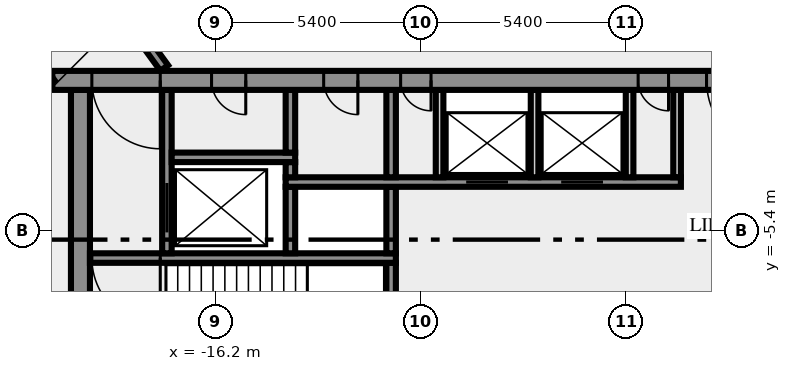
"""IFC4 building model, lengths in metres.
Left out: names, types, materials, properties, quantities, classifications, styles, units other than length and angle.
Written with IfcOpenShell. Run it as: python <this file> out.ifc"""

import sys

from ifc_helpers import new_model, si_unit, direction, frame, frame_2d, origin, place, context, subcontext, project, spatial, rectangle, extrude, element, fill, save


model = new_model("IFC4")
c1 = context("Model", 3, precision=1e-05, world=origin(), true_north=direction((0.0, 1.0)))
c2 = subcontext(c1, "Body", "Model", "MODEL_VIEW")
j1 = project(units=[si_unit("LENGTHUNIT", "METRE"), si_unit("PLANEANGLEUNIT", "RADIAN")], contexts=[c1])
p1 = place(None, origin())
s1 = spatial("IfcSite", under=j1, at=p1, CompositionType="ELEMENT")
p2 = place(p1, origin())
s2 = spatial("IfcBuilding", under=s1, at=p2, CompositionType="ELEMENT")
p3 = place(p2, frame((0.0, 0.0, 307.0)))
s3 = spatial("IfcBuildingStorey", under=s2, at=p3, CompositionType="ELEMENT", Elevation=307.0)
p4 = place(p3, frame((-19.75, -10.5, 0.0), z_axis=(0.0, 0.0, 1.0), x_axis=(0.0, 1.0, 0.0)))
e1 = element("IfcWall", 1, at=p4, inside=s3, PredefinedType="SHEAR", context=c2, shape_type="SweptSolid", body=[
    extrude(rectangle(XDim=8.8, YDim=0.5, at=frame_2d((4.4, 0.0))), origin(), (0.0, 0.0, 1.0), 3.65),
])
p5 = place(p3, frame((-11.575, -7.25, 0.0), z_axis=(0.0, 0.0, 1.0), x_axis=(0.0, 1.0, 0.0)))
e2 = element("IfcWall", 2, at=p5, inside=s3, PredefinedType="SHEAR", context=c2, shape_type="SweptSolid", body=[
    extrude(rectangle(XDim=1.0, YDim=0.25, at=frame_2d((0.5, 0.0))), origin(), (0.0, 0.0, 1.0), 3.65),
])
p6 = place(p3, frame((-11.45, -6.125, 0.0), z_axis=(0.0, 0.0, 1.0), x_axis=(-1.0, 0.0, 0.0)))
e3 = element("IfcWall", 3, at=p6, inside=s3, PredefinedType="SHEAR", context=c2, shape_type="SweptSolid", body=[
    extrude(rectangle(XDim=8.05, YDim=0.25, at=frame_2d((4.025, 0.0))), origin(), (0.0, 0.0, 1.0), 3.65),
])
p7 = place(p6, frame((6.2, 0.0, 0.0)))
e4 = element("IfcOpeningElement", 4, at=p7, cuts=e3, PredefinedType="OPENING", context=c2, shape_type="SweptSolid", body=[
    extrude(rectangle(XDim=1.8, YDim=2.1, at=frame_2d((0.9, 1.05))), frame((0.0, 0.135, 0.0), z_axis=(0.0, -1.0, 0.0), x_axis=(1.0, 0.0, 0.0)), (0.0, 0.0, 1.0), 0.27),
])
p8 = place(p3, frame((-17.475, -6.0, 0.0), z_axis=(0.0, 0.0, 1.0), x_axis=(0.0, 1.0, 0.0)))
e5 = element("IfcWall", 5, at=p8, inside=s3, PredefinedType="SHEAR", context=c2, shape_type="SweptSolid", body=[
    extrude(rectangle(XDim=4.3, YDim=0.25, at=frame_2d((2.15, 0.0))), origin(), (0.0, 0.0, 1.0), 3.65),
])
p9 = place(p8, frame((0.55, 0.0, 0.0)))
e6 = element("IfcOpeningElement", 6, at=p9, cuts=e5, PredefinedType="OPENING", context=c2, shape_type="SweptSolid", body=[
    extrude(rectangle(XDim=1.3, YDim=2.1, at=frame_2d((0.65, 1.05))), frame((0.0, 0.135, 0.0), z_axis=(0.0, -1.0, 0.0), x_axis=(1.0, 0.0, 0.0)), (0.0, 0.0, 1.0), 0.27),
])
for number, where, z_axis, x_axis in (
    (7, (-14.225, -6.0, 0.0), (0.0, 0.0, 1.0), (0.0, 1.0, 0.0)),
    (8, (-11.575, -6.0, 0.0), (0.0, 0.0, 1.0), (0.0, 1.0, 0.0)),
):
    element("IfcWall", number, at=place(p3, frame(where, z_axis=z_axis, x_axis=x_axis)), inside=s3, PredefinedType="SHEAR", context=c2, shape_type="SweptSolid", body=[
        extrude(rectangle(XDim=1.75, YDim=0.25, at=frame_2d((0.875, 0.0))), origin(), (0.0, 0.0, 1.0), 3.65),
    ])
p10 = place(p3, frame((-14.35, -4.125, 0.0), z_axis=(0.0, 0.0, 1.0), x_axis=(1.0, 0.0, 0.0)))
e9 = element("IfcWall", 9, at=p10, inside=s3, PredefinedType="SHEAR", context=c2, shape_type="SweptSolid", body=[
    extrude(rectangle(XDim=10.4, YDim=0.25, at=frame_2d((5.2, 0.0))), origin(), (0.0, 0.0, 1.0), 3.65),
])
p11 = place(p10, frame((4.75, 0.0, 0.0)))
e10 = element("IfcOpeningElement", 10, at=p11, cuts=e9, PredefinedType="OPENING", context=c2, shape_type="SweptSolid", body=[
    extrude(rectangle(XDim=1.1, YDim=2.1, at=frame_2d((0.55, 1.05))), frame((0.0, 0.135, 0.0), z_axis=(0.0, -1.0, 0.0), x_axis=(1.0, 0.0, 0.0)), (0.0, 0.0, 1.0), 0.27),
])
p12 = place(p10, frame((7.25, 0.0, 0.0)))
e11 = element("IfcOpeningElement", 11, at=p12, cuts=e9, PredefinedType="OPENING", context=c2, shape_type="SweptSolid", body=[
    extrude(rectangle(XDim=1.1, YDim=2.1, at=frame_2d((0.55, 1.05))), frame((0.0, 0.135, 0.0), z_axis=(0.0, -1.0, 0.0), x_axis=(1.0, 0.0, 0.0)), (0.0, 0.0, 1.0), 0.27),
])
p13 = place(p3, frame((-14.225, -4.0, 0.0), z_axis=(0.0, 0.0, 1.0), x_axis=(0.0, 1.0, 0.0)))
e12 = element("IfcWall", 12, at=p13, inside=s3, PredefinedType="SHEAR", context=c2, shape_type="SweptSolid", body=[
    extrude(rectangle(XDim=0.4, YDim=0.25, at=frame_2d((0.2, 0.0))), origin(), (0.0, 0.0, 1.0), 3.65),
])
p14 = place(p3, frame((-11.575, -4.0, 0.0), z_axis=(0.0, 0.0, 1.0), x_axis=(0.0, 1.0, 0.0)))
e13 = element("IfcWall", 13, at=p14, inside=s3, PredefinedType="SHEAR", context=c2, shape_type="SweptSolid", body=[
    extrude(rectangle(XDim=2.3, YDim=0.25, at=frame_2d((1.15, 0.0))), origin(), (0.0, 0.0, 1.0), 3.65),
])
for number, where, z_axis, x_axis in (
    (14, (-10.3, -4.0, 0.0), (0.0, 0.0, 1.0), (0.0, 1.0, 0.0)),
    (15, (-7.8, -4.0, 0.0), (0.0, 0.0, 1.0), (0.0, 1.0, 0.0)),
    (16, (-5.3, -4.0, 0.0), (0.0, 0.0, 1.0), (0.0, 1.0, 0.0)),
    (17, (-4.05, -4.0, 0.0), (0.0, 0.0, 1.0), (0.0, 1.0, 0.0)),
):
    element("IfcWall", number, at=place(p3, frame(where, z_axis=z_axis, x_axis=x_axis)), inside=s3, PredefinedType="SOLIDWALL", context=c2, shape_type="SweptSolid", body=[
        extrude(rectangle(XDim=2.3, YDim=0.2, at=frame_2d((1.15, 0.0))), origin(), (0.0, 0.0, 1.0), 3.65),
    ])
p15 = place(p3, frame((-17.35, -3.475, 0.0), z_axis=(0.0, 0.0, 1.0), x_axis=(1.0, 0.0, 0.0)))
e18 = element("IfcWall", 18, at=p15, inside=s3, PredefinedType="SHEAR", context=c2, shape_type="SweptSolid", body=[
    extrude(rectangle(XDim=3.25, YDim=0.25, at=frame_2d((1.625, 0.0))), origin(), (0.0, 0.0, 1.0), 3.65),
])
p16 = place(p3, frame((-14.225, -3.35, 0.0), z_axis=(0.0, 0.0, 1.0), x_axis=(0.0, 1.0, 0.0)))
e19 = element("IfcWall", 19, at=p16, inside=s3, PredefinedType="SHEAR", context=c2, shape_type="SweptSolid", body=[
    extrude(rectangle(XDim=1.65, YDim=0.25, at=frame_2d((0.825, 0.0))), origin(), (0.0, 0.0, 1.0), 3.65),
])
p17 = place(p3, frame((20.49, -1.45, 0.0), z_axis=(0.0, 0.0, 1.0), x_axis=(-1.0, 0.0, 0.0)))
e20 = element("IfcWall", 20, at=p17, inside=s3, PredefinedType="SHEAR", context=c2, shape_type="SweptSolid", body=[
    extrude(rectangle(XDim=40.98, YDim=0.5, at=frame_2d((20.49, 0.0))), origin(), (0.0, 0.0, 1.0), 3.65),
])
p18 = place(p17, frame((38.14, 0.0, 0.0)))
e21 = element("IfcOpeningElement", 21, at=p18, cuts=e20, PredefinedType="OPENING", context=c2, shape_type="SweptSolid", body=[
    extrude(rectangle(XDim=1.8, YDim=2.1, at=frame_2d((0.9, 1.05))), frame((0.0, 0.26, 0.0), z_axis=(0.0, -1.0, 0.0), x_axis=(1.0, 0.0, 0.0)), (0.0, 0.0, 1.0), 0.52),
])
p19 = place(p17, frame((35.89, 0.0, 0.0)))
e22 = element("IfcOpeningElement", 22, at=p19, cuts=e20, PredefinedType="OPENING", context=c2, shape_type="SweptSolid", body=[
    extrude(rectangle(XDim=0.9, YDim=2.1, at=frame_2d((0.45, 1.05))), frame((0.0, 0.26, 0.0), z_axis=(0.0, -1.0, 0.0), x_axis=(1.0, 0.0, 0.0)), (0.0, 0.0, 1.0), 0.52),
])
p20 = place(p17, frame((32.94, 0.0, 0.0)))
e23 = element("IfcOpeningElement", 23, at=p20, cuts=e20, PredefinedType="OPENING", context=c2, shape_type="SweptSolid", body=[
    extrude(rectangle(XDim=0.9, YDim=2.1, at=frame_2d((0.45, 1.05))), frame((0.0, 0.26, 0.0), z_axis=(0.0, -1.0, 0.0), x_axis=(1.0, 0.0, 0.0)), (0.0, 0.0, 1.0), 0.52),
])
p21 = place(p17, frame((31.015, 0.0, 0.0)))
e24 = element("IfcOpeningElement", 24, at=p21, cuts=e20, PredefinedType="OPENING", context=c2, shape_type="SweptSolid", body=[
    extrude(rectangle(XDim=0.8, YDim=2.1, at=frame_2d((0.4, 1.05))), frame((0.0, 0.26, 0.0), z_axis=(0.0, -1.0, 0.0), x_axis=(1.0, 0.0, 0.0)), (0.0, 0.0, 1.0), 0.52),
])
p22 = place(p17, frame((24.765, 0.0, 0.0)))
e25 = element("IfcOpeningElement", 25, at=p22, cuts=e20, PredefinedType="OPENING", context=c2, shape_type="SweptSolid", body=[
    extrude(rectangle(XDim=0.8, YDim=2.1, at=frame_2d((0.4, 1.05))), frame((0.0, 0.26, 0.0), z_axis=(0.0, -1.0, 0.0), x_axis=(1.0, 0.0, 0.0)), (0.0, 0.0, 1.0), 0.52),
])
p23 = place(p17, frame((21.765, 0.0, 0.0)))
e26 = element("IfcOpeningElement", 26, at=p23, cuts=e20, PredefinedType="OPENING", context=c2, shape_type="SweptSolid", body=[
    extrude(rectangle(XDim=2.0, YDim=2.1, at=frame_2d((1.0, 1.05))), frame((0.0, 0.26, 0.0), z_axis=(0.0, -1.0, 0.0), x_axis=(1.0, 0.0, 0.0)), (0.0, 0.0, 1.0), 0.52),
])
p24 = place(p17, frame((12.24, 0.0, 0.0)))
e27 = element("IfcOpeningElement", 27, at=p24, cuts=e20, PredefinedType="OPENING", context=c2, shape_type="SweptSolid", body=[
    extrude(rectangle(XDim=0.9, YDim=2.1, at=frame_2d((0.45, 1.05))), frame((0.0, 0.26, 0.0), z_axis=(0.0, -1.0, 0.0), x_axis=(1.0, 0.0, 0.0)), (0.0, 0.0, 1.0), 0.52),
])
p25 = place(p17, frame((7.14, 0.0, 0.0)))
e28 = element("IfcOpeningElement", 28, at=p25, cuts=e20, PredefinedType="OPENING", context=c2, shape_type="SweptSolid", body=[
    extrude(rectangle(XDim=0.9, YDim=2.1, at=frame_2d((0.45, 1.05))), frame((0.0, 0.26, 0.0), z_axis=(0.0, -1.0, 0.0), x_axis=(1.0, 0.0, 0.0)), (0.0, 0.0, 1.0), 0.52),
])
p26 = place(p17, frame((5.028, 0.0, 0.0)))
e29 = element("IfcOpeningElement", 29, at=p26, cuts=e20, PredefinedType="OPENING", context=c2, shape_type="SweptSolid", body=[
    extrude(rectangle(XDim=0.8, YDim=2.1, at=frame_2d((0.4, 1.05))), frame((0.0, 0.26, 0.0), z_axis=(0.0, -1.0, 0.0), x_axis=(1.0, 0.0, 0.0)), (0.0, 0.0, 1.0), 0.52),
])
p27 = place(p17, frame((3.452, 0.0, 0.0)))
e30 = element("IfcOpeningElement", 30, at=p27, cuts=e20, PredefinedType="OPENING", context=c2, shape_type="SweptSolid", body=[
    extrude(rectangle(XDim=0.8, YDim=2.1, at=frame_2d((0.4, 1.05))), frame((0.0, 0.26, 0.0), z_axis=(0.0, -1.0, 0.0), x_axis=(1.0, 0.0, 0.0)), (0.0, 0.0, 1.0), 0.52),
])
p28 = place(p17, frame((1.04, 0.0, 0.0)))
e31 = element("IfcOpeningElement", 31, at=p28, cuts=e20, PredefinedType="OPENING", context=c2, shape_type="SweptSolid", body=[
    extrude(rectangle(XDim=1.8, YDim=2.1, at=frame_2d((0.9, 1.05))), frame((0.0, 0.26, 0.0), z_axis=(0.0, -1.0, 0.0), x_axis=(1.0, 0.0, 0.0)), (0.0, 0.0, 1.0), 0.52),
])
p29 = place(p3, frame((-20.531, -1.523, 0.0), z_axis=(0.0, 0.0, 1.0), x_axis=(-0.587785867777, 0.809016547199, 0.0)))
e32 = element("IfcWall", 32, at=p29, inside=s3, PredefinedType="SOLIDWALL", context=c2, shape_type="SweptSolid", body=[
    extrude(rectangle(XDim=16.67, YDim=0.25, at=frame_2d((8.335, 0.0))), origin(), (0.0, 0.0, 1.0), 3.65),
])
p30 = place(p29, frame((15.296, 0.0, 0.0)))
e33 = element("IfcOpeningElement", 33, at=p30, cuts=e32, PredefinedType="OPENING", context=c2, shape_type="SweptSolid", body=[
    extrude(rectangle(XDim=0.9, YDim=2.1, at=frame_2d((0.45, 1.05))), frame((0.0, 0.135, 0.0), z_axis=(0.0, -1.0, 0.0), x_axis=(1.0, 0.0, 0.0)), (0.0, 0.0, 1.0), 0.27),
])
p31 = place(p3, frame((-28.039, 13.319, 0.0), z_axis=(0.0, 0.0, 1.0), x_axis=(0.587791911753, -0.809012155952, 0.0)))
e34 = element("IfcWall", 34, at=p31, inside=s3, PredefinedType="SOLIDWALL", context=c2, shape_type="SweptSolid", body=[
    extrude(rectangle(XDim=17.853, YDim=0.25, at=frame_2d((8.927, 0.0))), origin(), (0.0, 0.0, 1.0), 3.65),
])
p32 = place(p31, frame((13.512, 0.0, 0.0)))
e35 = element("IfcOpeningElement", 35, at=p32, cuts=e34, PredefinedType="OPENING", context=c2, shape_type="SweptSolid", body=[
    extrude(rectangle(XDim=0.9, YDim=2.1, at=frame_2d((0.45, 1.05))), frame((0.0, 0.135, 0.0), z_axis=(0.0, -1.0, 0.0), x_axis=(1.0, 0.0, 0.0)), (0.0, 0.0, 1.0), 0.27),
])
p33 = place(p7, origin())
e36 = element("IfcDoor", 36, at=p33, inside=s3, OperationType="DOUBLE_DOOR_SINGLE_SWING", PredefinedType="DOOR", context=c2, shape_type="SweptSolid", body=[
    extrude(rectangle(XDim=1.8, YDim=2.1, at=frame_2d((0.9, 1.05))), frame((0.0, 0.025, 0.0), z_axis=(0.0, -1.0, 0.0), x_axis=(1.0, 0.0, 0.0)), (0.0, 0.0, 1.0), 0.05),
])
fill(e4, e36)
p34 = place(p9, origin())
e37 = element("IfcDoor", 37, at=p34, inside=s3, OperationType="DOUBLE_DOOR_SLIDING", PredefinedType="DOOR", context=c2, shape_type="SweptSolid", body=[
    extrude(rectangle(XDim=1.3, YDim=2.1, at=frame_2d((0.65, 1.05))), frame((0.0, 0.025, 0.0), z_axis=(0.0, -1.0, 0.0), x_axis=(1.0, 0.0, 0.0)), (0.0, 0.0, 1.0), 0.05),
])
fill(e6, e37)
p35 = place(p11, origin())
e38 = element("IfcDoor", 38, at=p35, inside=s3, OperationType="DOUBLE_DOOR_SLIDING", PredefinedType="DOOR", context=c2, shape_type="SweptSolid", body=[
    extrude(rectangle(XDim=1.1, YDim=2.1, at=frame_2d((0.55, 1.05))), frame((0.0, 0.025, 0.0), z_axis=(0.0, -1.0, 0.0), x_axis=(1.0, 0.0, 0.0)), (0.0, 0.0, 1.0), 0.05),
])
fill(e10, e38)
p36 = place(p12, origin())
e39 = element("IfcDoor", 39, at=p36, inside=s3, OperationType="DOUBLE_DOOR_SLIDING", PredefinedType="DOOR", context=c2, shape_type="SweptSolid", body=[
    extrude(rectangle(XDim=1.1, YDim=2.1, at=frame_2d((0.55, 1.05))), frame((0.0, 0.025, 0.0), z_axis=(0.0, -1.0, 0.0), x_axis=(1.0, 0.0, 0.0)), (0.0, 0.0, 1.0), 0.05),
])
fill(e11, e39)
p37 = place(p18, origin())
e40 = element("IfcDoor", 40, at=p37, inside=s3, OperationType="DOUBLE_DOOR_SINGLE_SWING", PredefinedType="DOOR", context=c2, shape_type="SweptSolid", body=[
    extrude(rectangle(XDim=1.8, YDim=2.1, at=frame_2d((0.9, 1.05))), frame((0.0, 0.025, 0.0), z_axis=(0.0, -1.0, 0.0), x_axis=(1.0, 0.0, 0.0)), (0.0, 0.0, 1.0), 0.05),
])
fill(e21, e40)
p38 = place(p19, origin())
e41 = element("IfcDoor", 41, at=p38, inside=s3, OperationType="SINGLE_SWING_RIGHT", PredefinedType="DOOR", context=c2, shape_type="SweptSolid", body=[
    extrude(rectangle(XDim=0.9, YDim=2.1, at=frame_2d((0.45, 1.05))), frame((0.0, 0.025, 0.0), z_axis=(0.0, -1.0, 0.0), x_axis=(1.0, 0.0, 0.0)), (0.0, 0.0, 1.0), 0.05),
])
fill(e22, e41)
p39 = place(p20, origin())
e42 = element("IfcDoor", 42, at=p39, inside=s3, OperationType="SINGLE_SWING_RIGHT", PredefinedType="DOOR", context=c2, shape_type="SweptSolid", body=[
    extrude(rectangle(XDim=0.9, YDim=2.1, at=frame_2d((0.45, 1.05))), frame((0.0, 0.025, 0.0), z_axis=(0.0, -1.0, 0.0), x_axis=(1.0, 0.0, 0.0)), (0.0, 0.0, 1.0), 0.05),
])
fill(e23, e42)
p40 = place(p21, origin())
e43 = element("IfcDoor", 43, at=p40, inside=s3, OperationType="SINGLE_SWING_RIGHT", PredefinedType="DOOR", context=c2, shape_type="SweptSolid", body=[
    extrude(rectangle(XDim=0.8, YDim=2.1, at=frame_2d((0.4, 1.05))), frame((0.0, 0.025, 0.0), z_axis=(0.0, -1.0, 0.0), x_axis=(1.0, 0.0, 0.0)), (0.0, 0.0, 1.0), 0.05),
])
fill(e24, e43)
p41 = place(p22, origin())
e44 = element("IfcDoor", 44, at=p41, inside=s3, OperationType="SINGLE_SWING_RIGHT", PredefinedType="DOOR", context=c2, shape_type="SweptSolid", body=[
    extrude(rectangle(XDim=0.8, YDim=2.1, at=frame_2d((0.4, 1.05))), frame((0.0, 0.025, 0.0), z_axis=(0.0, -1.0, 0.0), x_axis=(1.0, 0.0, 0.0)), (0.0, 0.0, 1.0), 0.05),
])
fill(e25, e44)
p42 = place(p23, origin())
e45 = element("IfcDoor", 45, at=p42, inside=s3, OperationType="DOUBLE_DOOR_SINGLE_SWING", PredefinedType="DOOR", context=c2, shape_type="SweptSolid", body=[
    extrude(rectangle(XDim=2.0, YDim=2.1, at=frame_2d((1.0, 1.05))), frame((0.0, 0.025, 0.0), z_axis=(0.0, -1.0, 0.0), x_axis=(1.0, 0.0, 0.0)), (0.0, 0.0, 1.0), 0.05),
])
fill(e26, e45)
save(model, sys.argv[1])
